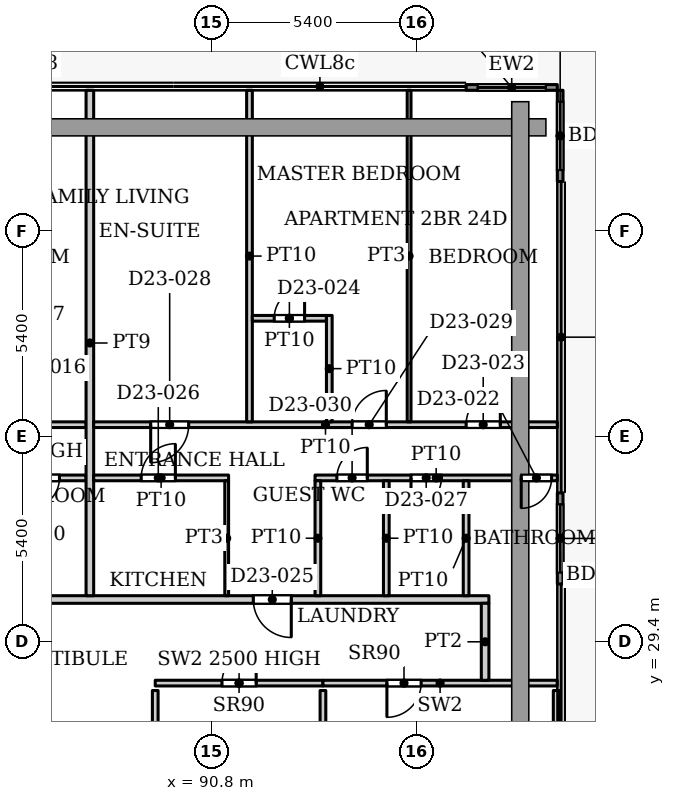
"""IFC4 building model, lengths in metres.
Left out: names, types, materials, properties, quantities, classifications, styles, units other than length and angle.
Written with IfcOpenShell. Run it as: python <this file> out.ifc"""

import sys

from ifc_helpers import new_model, si_unit, direction, frame, frame_2d, origin, place, context, subcontext, project, spatial, rectangle, extrude, source, transform, mapped, element, fill, save


model = new_model("IFC4")
c1 = context("Model", 3, precision=1e-05, world=origin(), true_north=direction((0.0, 1.0)))
c2 = subcontext(c1, "Body", "Model", "MODEL_VIEW")
j1 = project(units=[si_unit("LENGTHUNIT", "METRE"), si_unit("PLANEANGLEUNIT", "RADIAN")], contexts=[c1])
p1 = place(None, origin())
s1 = spatial("IfcSite", under=j1, at=p1, CompositionType="ELEMENT")
p2 = place(p1, origin())
s2 = spatial("IfcBuilding", under=s1, at=p2, CompositionType="ELEMENT")
p3 = place(p2, frame((0.0, 0.0, 105.8)))
s3 = spatial("IfcBuildingStorey", under=s2, at=p3, CompositionType="ELEMENT", Elevation=105.8)
p4 = place(p3, frame((97.5, 43.975, 0.0), z_axis=(0.0, 0.0, 1.0), x_axis=(1.0, 0.0, 0.0)))
e1 = element("IfcWall", 1, at=p4, inside=s3, PredefinedType="SOLIDWALL", context=c2, shape_type="SweptSolid", body=[
    extrude(rectangle(XDim=2.4, YDim=0.15, at=frame_2d((1.2, 0.0))), origin(), (0.0, 0.0, 1.0), 3.75),
])
p5 = place(p4, frame((0.3, 0.0, 0.0)))
e2 = element("IfcOpeningElement", 2, at=p5, cuts=e1, PredefinedType="OPENING", context=c2, shape_type="SweptSolid", body=[
    extrude(rectangle(XDim=1.8, YDim=2.4, at=frame_2d((0.9, 1.2))), frame((0.0, 0.085, 0.0), z_axis=(0.0, -1.0, 0.0), x_axis=(1.0, 0.0, 0.0)), (0.0, 0.0, 1.0), 0.17),
])
p6 = place(p3, frame((99.975, 43.9, 0.0), z_axis=(0.0, 0.0, 1.0), x_axis=(0.0, -1.0, 0.0)))
e3 = element("IfcWall", 3, at=p6, inside=s3, PredefinedType="SOLIDWALL", context=c2, shape_type="SweptSolid", body=[
    extrude(rectangle(XDim=2.4, YDim=0.15, at=frame_2d((1.2, 0.0))), origin(), (0.0, 0.0, 1.0), 3.75),
])
p7 = place(p6, frame((0.3, 0.0, 0.0)))
e4 = element("IfcOpeningElement", 4, at=p7, cuts=e3, PredefinedType="OPENING", context=c2, shape_type="SweptSolid", body=[
    extrude(rectangle(XDim=1.8, YDim=2.4, at=frame_2d((0.9, 1.2))), frame((0.0, 0.085, 0.0), z_axis=(0.0, -1.0, 0.0), x_axis=(1.0, 0.0, 0.0)), (0.0, 0.0, 1.0), 0.17),
])
p8 = place(p3, frame((99.975, 33.307, 0.0), z_axis=(0.0, 0.0, 1.0), x_axis=(0.0, -1.0, 0.0)))
e5 = element("IfcWall", 5, at=p8, inside=s3, PredefinedType="SOLIDWALL", context=c2, shape_type="SweptSolid", body=[
    extrude(rectangle(XDim=2.4, YDim=0.15, at=frame_2d((1.2, 0.0))), origin(), (0.0, 0.0, 1.0), 3.75),
])
p9 = place(p8, frame((0.3, 0.0, 0.0)))
e6 = element("IfcOpeningElement", 6, at=p9, cuts=e5, PredefinedType="OPENING", context=c2, shape_type="SweptSolid", body=[
    extrude(rectangle(XDim=1.8, YDim=2.4, at=frame_2d((0.9, 1.2))), frame((0.0, 0.085, 0.0), z_axis=(0.0, -1.0, 0.0), x_axis=(1.0, 0.0, 0.0)), (0.0, 0.0, 1.0), 0.17),
])
p10 = place(p3, frame((89.32, 28.3, 0.0), z_axis=(0.0, 0.0, 1.0), x_axis=(1.0, 0.0, 0.0)))
e7 = element("IfcWall", 7, at=p10, inside=s3, PredefinedType="PARTITIONING", context=c2, shape_type="SweptSolid", body=[
    extrude(rectangle(XDim=4.413, YDim=0.15, at=frame_2d((2.207, 0.0))), origin(), (0.0, 0.0, 1.0), 2.5),
])
p11 = place(p10, frame((1.756, 0.0, 0.0)))
e8 = element("IfcOpeningElement", 8, at=p11, cuts=e7, PredefinedType="OPENING", context=c2, shape_type="SweptSolid", body=[
    extrude(rectangle(XDim=0.9, YDim=2.2, at=frame_2d((0.45, 1.1))), frame((0.0, 0.085, 0.0), z_axis=(0.0, -1.0, 0.0), x_axis=(1.0, 0.0, 0.0)), (0.0, 0.0, 1.0), 0.17),
])
p12 = place(p3, frame((89.32, 25.62, 0.0), z_axis=(0.0, 0.0, 1.0), x_axis=(0.0, 1.0, 0.0)))
e9 = element("IfcWall", 9, at=p12, inside=s3, PredefinedType="PARTITIONING", context=c2, shape_type="SweptSolid", body=[
    extrude(rectangle(XDim=2.485, YDim=0.15, at=frame_2d((1.242, 0.0))), origin(), (0.0, 0.0, 1.0), 3.9),
])
p13 = place(p3, frame((93.733, 21.338, 0.0), z_axis=(0.0, 0.0, 1.0), x_axis=(0.0, 1.0, 0.0)))
e10 = element("IfcWall", 10, at=p13, inside=s3, PredefinedType="PARTITIONING", context=c2, shape_type="SweptSolid", body=[
    extrude(rectangle(XDim=6.767, YDim=0.15, at=frame_2d((3.384, 0.0))), origin(), (0.0, 0.0, 1.0), 3.9),
])
p14 = place(p3, frame((93.733, 28.3, 0.0), z_axis=(0.0, 0.0, 1.0), x_axis=(1.0, 0.0, 0.0)))
e11 = element("IfcWall", 11, at=p14, inside=s3, PredefinedType="PARTITIONING", context=c2, shape_type="SweptSolid", body=[
    extrude(rectangle(XDim=6.165, YDim=0.15, at=frame_2d((3.083, 0.0))), origin(), (0.0, 0.0, 1.0), 3.9),
])
p15 = place(p14, frame((1.683, 0.0, 0.0)))
e12 = element("IfcOpeningElement", 12, at=p15, cuts=e11, PredefinedType="OPENING", context=c2, shape_type="SweptSolid", body=[
    extrude(rectangle(XDim=0.9, YDim=2.2, at=frame_2d((0.45, 1.1))), frame((0.0, 0.085, 0.0), z_axis=(0.0, -1.0, 0.0), x_axis=(1.0, 0.0, 0.0)), (0.0, 0.0, 1.0), 0.17),
])
p16 = place(p3, frame((99.87, 21.015, 0.0), z_axis=(0.0, 0.0, 1.0), x_axis=(0.0, 1.0, 0.0)))
e13 = element("IfcWall", 13, at=p16, inside=s3, PredefinedType="PARTITIONING", context=c2, shape_type="SweptSolid", body=[
    extrude(rectangle(XDim=7.09, YDim=0.15, at=frame_2d((3.545, 0.0))), origin(), (0.0, 0.0, 1.0), 3.9),
])
p17 = place(p3, frame((55.9, 30.5, 0.0), z_axis=(0.0, 0.0, 1.0), x_axis=(1.0, 0.0, 0.0)))
e14 = element("IfcWall", 14, at=p17, inside=s3, PredefinedType="PARTITIONING", context=c2, shape_type="SweptSolid", body=[
    extrude(rectangle(XDim=42.2, YDim=0.2, at=frame_2d((21.1, 0.0))), origin(), (0.0, 0.0, 1.0), 3.6),
])
p18 = place(p17, frame((10.35, 0.0, 0.0)))
e15 = element("IfcOpeningElement", 15, at=p18, cuts=e14, PredefinedType="OPENING", context=c2, shape_type="SweptSolid", body=[
    extrude(rectangle(XDim=1.0, YDim=2.1, at=frame_2d((0.5, 1.05))), frame((0.0, 0.11, 0.0), z_axis=(0.0, -1.0, 0.0), x_axis=(1.0, 0.0, 0.0)), (0.0, 0.0, 1.0), 0.22),
])
p19 = place(p17, frame((16.65, 0.0, 0.0)))
e16 = element("IfcOpeningElement", 16, at=p19, cuts=e14, PredefinedType="OPENING", context=c2, shape_type="SweptSolid", body=[
    extrude(rectangle(XDim=1.0, YDim=2.1, at=frame_2d((0.5, 1.05))), frame((0.0, 0.11, 0.0), z_axis=(0.0, -1.0, 0.0), x_axis=(1.0, 0.0, 0.0)), (0.0, 0.0, 1.0), 0.22),
])
p20 = place(p17, frame((27.6, 0.0, 0.0)))
e17 = element("IfcOpeningElement", 17, at=p20, cuts=e14, PredefinedType="OPENING", context=c2, shape_type="SweptSolid", body=[
    extrude(rectangle(XDim=1.0, YDim=2.1, at=frame_2d((0.5, 1.05))), frame((0.0, 0.11, 0.0), z_axis=(0.0, -1.0, 0.0), x_axis=(1.0, 0.0, 0.0)), (0.0, 0.0, 1.0), 0.22),
])
p21 = place(p17, frame((36.0, 0.0, 0.0)))
e18 = element("IfcOpeningElement", 18, at=p21, cuts=e14, PredefinedType="OPENING", context=c2, shape_type="SweptSolid", body=[
    extrude(rectangle(XDim=1.0, YDim=2.1, at=frame_2d((0.5, 1.05))), frame((0.0, 0.11, 0.0), z_axis=(0.0, -1.0, 0.0), x_axis=(1.0, 0.0, 0.0)), (0.0, 0.0, 1.0), 0.22),
])
p22 = place(p3, frame((77.5, 35.1, 0.0), z_axis=(0.0, 0.0, 1.0), x_axis=(1.0, 0.0, 0.0)))
e19 = element("IfcWall", 19, at=p22, inside=s3, PredefinedType="PARTITIONING", context=c2, shape_type="SweptSolid", body=[
    extrude(rectangle(XDim=10.0, YDim=0.15, at=frame_2d((5.0, 0.0))), origin(), (0.0, 0.0, 1.0), 3.6),
])
p23 = place(p22, frame((7.9, 0.0, 0.0)))
e20 = element("IfcOpeningElement", 20, at=p23, cuts=e19, PredefinedType="OPENING", context=c2, shape_type="SweptSolid", body=[
    extrude(rectangle(XDim=0.9, YDim=2.1, at=frame_2d((0.45, 1.05))), frame((0.0, 0.085, 0.0), z_axis=(0.0, -1.0, 0.0), x_axis=(1.0, 0.0, 0.0)), (0.0, 0.0, 1.0), 0.17),
])
p24 = place(p22, frame((2.55, 0.0, 0.0)))
e21 = element("IfcOpeningElement", 21, at=p24, cuts=e19, PredefinedType="OPENING", context=c2, shape_type="SweptSolid", body=[
    extrude(rectangle(XDim=1.0, YDim=2.1, at=frame_2d((0.5, 1.05))), frame((0.0, 0.085, 0.0), z_axis=(0.0, -1.0, 0.0), x_axis=(1.0, 0.0, 0.0)), (0.0, 0.0, 1.0), 0.17),
])
p25 = place(p3, frame((85.275, 33.7, 0.0), z_axis=(0.0, 0.0, 1.0), x_axis=(1.0, 0.0, 0.0)))
e22 = element("IfcWall", 22, at=p25, inside=s3, PredefinedType="PARTITIONING", context=c2, shape_type="SweptSolid", body=[
    extrude(rectangle(XDim=2.225, YDim=0.15, at=frame_2d((1.113, 0.0))), origin(), (0.0, 0.0, 1.0), 3.6),
])
p26 = place(p25, frame((0.725, 0.0, 0.0)))
e23 = element("IfcOpeningElement", 23, at=p26, cuts=e22, PredefinedType="OPENING", context=c2, shape_type="SweptSolid", body=[
    extrude(rectangle(XDim=0.8, YDim=2.1, at=frame_2d((0.4, 1.05))), frame((0.0, 0.085, 0.0), z_axis=(0.0, -1.0, 0.0), x_axis=(1.0, 0.0, 0.0)), (0.0, 0.0, 1.0), 0.17),
])
p27 = place(p3, frame((87.6, 30.6, 0.0), z_axis=(0.0, 0.0, 1.0), x_axis=(0.0, 1.0, 0.0)))
e24 = element("IfcWall", 24, at=p27, inside=s3, PredefinedType="PARTITIONING", context=c2, shape_type="SweptSolid", body=[
    extrude(rectangle(XDim=13.3, YDim=0.2, at=frame_2d((6.65, 0.0))), origin(), (0.0, 0.0, 1.0), 3.6),
])
p28 = place(p3, frame((87.7, 33.7, 0.0), z_axis=(0.0, 0.0, 1.0), x_axis=(1.0, 0.0, 0.0)))
e25 = element("IfcWall", 25, at=p28, inside=s3, PredefinedType="PARTITIONING", context=c2, shape_type="SweptSolid", body=[
    extrude(rectangle(XDim=3.55, YDim=0.15, at=frame_2d((1.775, 0.0))), origin(), (0.0, 0.0, 1.0), 3.6),
])
p29 = place(p28, frame((1.25, 0.0, 0.0)))
e26 = element("IfcOpeningElement", 26, at=p29, cuts=e25, PredefinedType="OPENING", context=c2, shape_type="SweptSolid", body=[
    extrude(rectangle(XDim=0.9, YDim=2.1, at=frame_2d((0.45, 1.05))), frame((0.0, 0.085, 0.0), z_axis=(0.0, -1.0, 0.0), x_axis=(1.0, 0.0, 0.0)), (0.0, 0.0, 1.0), 0.17),
])
p30 = place(p3, frame((87.7, 35.1, 0.0), z_axis=(0.0, 0.0, 1.0), x_axis=(1.0, 0.0, 0.0)))
e27 = element("IfcWall", 27, at=p30, inside=s3, PredefinedType="PARTITIONING", context=c2, shape_type="SweptSolid", body=[
    extrude(rectangle(XDim=12.2, YDim=0.15, at=frame_2d((6.1, 0.0))), origin(), (0.0, 0.0, 1.0), 3.6),
])
p31 = place(p30, frame((9.8, 0.0, 0.0)))
e28 = element("IfcOpeningElement", 28, at=p31, cuts=e27, PredefinedType="OPENING", context=c2, shape_type="SweptSolid", body=[
    extrude(rectangle(XDim=0.9, YDim=2.1, at=frame_2d((0.45, 1.05))), frame((0.0, 0.085, 0.0), z_axis=(0.0, -1.0, 0.0), x_axis=(1.0, 0.0, 0.0)), (0.0, 0.0, 1.0), 0.17),
])
p32 = place(p30, frame((1.5, 0.0, 0.0)))
e29 = element("IfcOpeningElement", 29, at=p32, cuts=e27, PredefinedType="OPENING", context=c2, shape_type="SweptSolid", body=[
    extrude(rectangle(XDim=1.0, YDim=2.1, at=frame_2d((0.5, 1.05))), frame((0.0, 0.085, 0.0), z_axis=(0.0, -1.0, 0.0), x_axis=(1.0, 0.0, 0.0)), (0.0, 0.0, 1.0), 0.17),
])
p33 = place(p30, frame((6.8, 0.0, 0.0)))
e30 = element("IfcOpeningElement", 30, at=p33, cuts=e27, PredefinedType="OPENING", context=c2, shape_type="SweptSolid", body=[
    extrude(rectangle(XDim=0.9, YDim=2.1, at=frame_2d((0.45, 1.05))), frame((0.0, 0.085, 0.0), z_axis=(0.0, -1.0, 0.0), x_axis=(1.0, 0.0, 0.0)), (0.0, 0.0, 1.0), 0.17),
])
p34 = place(p3, frame((91.2, 30.6, 0.0), z_axis=(0.0, 0.0, 1.0), x_axis=(0.0, 1.0, 0.0)))
e31 = element("IfcWall", 31, at=p34, inside=s3, PredefinedType="PARTITIONING", context=c2, shape_type="SweptSolid", body=[
    extrude(rectangle(XDim=3.025, YDim=0.1, at=frame_2d((1.512, 0.0))), origin(), (0.0, 0.0, 1.0), 3.6),
])
p35 = place(p3, frame((91.8, 35.175, 0.0), z_axis=(0.0, 0.0, 1.0), x_axis=(0.0, 1.0, 0.0)))
e32 = element("IfcWall", 32, at=p35, inside=s3, PredefinedType="PARTITIONING", context=c2, shape_type="SweptSolid", body=[
    extrude(rectangle(XDim=8.725, YDim=0.15, at=frame_2d((4.362, 0.0))), origin(), (0.0, 0.0, 1.0), 3.6),
])
p36 = place(p3, frame((91.875, 37.9, 0.0), z_axis=(0.0, 0.0, 1.0), x_axis=(1.0, 0.0, 0.0)))
e33 = element("IfcWall", 33, at=p36, inside=s3, PredefinedType="PARTITIONING", context=c2, shape_type="SweptSolid", body=[
    extrude(rectangle(XDim=1.95, YDim=0.15, at=frame_2d((0.975, 0.0))), origin(), (0.0, 0.0, 1.0), 3.6),
])
p37 = place(p36, frame((0.575, 0.0, 0.0)))
e34 = element("IfcOpeningElement", 34, at=p37, cuts=e33, PredefinedType="OPENING", context=c2, shape_type="SweptSolid", body=[
    extrude(rectangle(XDim=0.8, YDim=2.1, at=frame_2d((0.4, 1.05))), frame((0.0, 0.085, 0.0), z_axis=(0.0, -1.0, 0.0), x_axis=(1.0, 0.0, 0.0)), (0.0, 0.0, 1.0), 0.17),
])
p38 = place(p3, frame((93.525, 33.7, 0.0), z_axis=(0.0, 0.0, 1.0), x_axis=(1.0, 0.0, 0.0)))
e35 = element("IfcWall", 35, at=p38, inside=s3, PredefinedType="PARTITIONING", context=c2, shape_type="SweptSolid", body=[
    extrude(rectangle(XDim=6.375, YDim=0.15, at=frame_2d((3.188, 0.0))), origin(), (0.0, 0.0, 1.0), 3.6),
])
p39 = place(p38, frame((5.425, 0.0, 0.0)))
e36 = element("IfcOpeningElement", 36, at=p39, cuts=e35, PredefinedType="OPENING", context=c2, shape_type="SweptSolid", body=[
    extrude(rectangle(XDim=0.8, YDim=2.1, at=frame_2d((0.4, 1.05))), frame((0.0, 0.085, 0.0), z_axis=(0.0, -1.0, 0.0), x_axis=(1.0, 0.0, 0.0)), (0.0, 0.0, 1.0), 0.17),
])
p40 = place(p38, frame((2.525, 0.0, 0.0)))
e37 = element("IfcOpeningElement", 37, at=p40, cuts=e35, PredefinedType="OPENING", context=c2, shape_type="SweptSolid", body=[
    extrude(rectangle(XDim=0.8, YDim=2.1, at=frame_2d((0.4, 1.05))), frame((0.0, 0.085, 0.0), z_axis=(0.0, -1.0, 0.0), x_axis=(1.0, 0.0, 0.0)), (0.0, 0.0, 1.0), 0.17),
])
p41 = place(p38, frame((0.575, 0.0, 0.0)))
e38 = element("IfcOpeningElement", 38, at=p41, cuts=e35, PredefinedType="OPENING", context=c2, shape_type="SweptSolid", body=[
    extrude(rectangle(XDim=0.8, YDim=2.1, at=frame_2d((0.4, 1.05))), frame((0.0, 0.085, 0.0), z_axis=(0.0, -1.0, 0.0), x_axis=(1.0, 0.0, 0.0)), (0.0, 0.0, 1.0), 0.17),
])
p42 = place(p3, frame((93.6, 30.6, 0.0), z_axis=(0.0, 0.0, 1.0), x_axis=(0.0, 1.0, 0.0)))
e39 = element("IfcWall", 39, at=p42, inside=s3, PredefinedType="PARTITIONING", context=c2, shape_type="SweptSolid", body=[
    extrude(rectangle(XDim=3.025, YDim=0.15, at=frame_2d((1.512, 0.0))), origin(), (0.0, 0.0, 1.0), 3.6),
])
p43 = place(p3, frame((93.9, 35.175, 0.0), z_axis=(0.0, 0.0, 1.0), x_axis=(0.0, 1.0, 0.0)))
e40 = element("IfcWall", 40, at=p43, inside=s3, PredefinedType="PARTITIONING", context=c2, shape_type="SweptSolid", body=[
    extrude(rectangle(XDim=2.8, YDim=0.15, at=frame_2d((1.4, 0.0))), origin(), (0.0, 0.0, 1.0), 3.6),
])
p44 = place(p3, frame((95.4, 30.6, 0.0), z_axis=(0.0, 0.0, 1.0), x_axis=(0.0, 1.0, 0.0)))
e41 = element("IfcWall", 41, at=p44, inside=s3, PredefinedType="PARTITIONING", context=c2, shape_type="SweptSolid", body=[
    extrude(rectangle(XDim=3.025, YDim=0.15, at=frame_2d((1.512, 0.0))), origin(), (0.0, 0.0, 1.0), 3.6),
])
p45 = place(p3, frame((96.0, 35.175, 0.0), z_axis=(0.0, 0.0, 1.0), x_axis=(0.0, 1.0, 0.0)))
e42 = element("IfcWall", 42, at=p45, inside=s3, PredefinedType="PARTITIONING", context=c2, shape_type="SweptSolid", body=[
    extrude(rectangle(XDim=8.725, YDim=0.1, at=frame_2d((4.362, 0.0))), origin(), (0.0, 0.0, 1.0), 3.6),
])
p46 = place(p3, frame((97.5, 30.6, 0.0), z_axis=(0.0, 0.0, 1.0), x_axis=(0.0, 1.0, 0.0)))
e43 = element("IfcWall", 43, at=p46, inside=s3, PredefinedType="PARTITIONING", context=c2, shape_type="SweptSolid", body=[
    extrude(rectangle(XDim=3.025, YDim=0.15, at=frame_2d((1.512, 0.0))), origin(), (0.0, 0.0, 1.0), 3.6),
])
p47 = place(p3, frame((98.0, 28.374, 0.0), z_axis=(0.0, 0.0, 1.0), x_axis=(0.0, 1.0, 0.0)))
e44 = element("IfcWall", 44, at=p47, inside=s3, PredefinedType="PARTITIONING", context=c2, shape_type="SweptSolid", body=[
    extrude(rectangle(XDim=2.026, YDim=0.2, at=frame_2d((1.013, 0.0))), origin(), (0.0, 0.0, 1.0), 3.6),
])
m1 = source(origin(), c2, "Body", "SweptSolid", [
    extrude(rectangle(XDim=1.8, YDim=2.4, at=frame_2d((0.9, 1.2))), frame((0.0, 0.025, 0.0), z_axis=(0.0, -1.0, 0.0), x_axis=(1.0, 0.0, 0.0)), (0.0, 0.0, 1.0), 0.05),
])
p48 = place(p5, origin())
e45 = element("IfcDoor", 45, at=p48, inside=s3, OperationType="SLIDING_TO_LEFT", PredefinedType="DOOR", context=c2, shape_type="MappedRepresentation", body=[
    mapped(m1, transform((0.0, 0.0, 0.0), x_axis=(1.0, 0.0, 0.0), y_axis=(0.0, 1.0, 0.0), z_axis=(0.0, 0.0, 1.0), scale=1.0)),
])
fill(e2, e45)
p49 = place(p7, origin())
e46 = element("IfcDoor", 46, at=p49, inside=s3, OperationType="SLIDING_TO_LEFT", PredefinedType="DOOR", context=c2, shape_type="MappedRepresentation", body=[
    mapped(m1, transform((0.0, 0.0, 0.0), x_axis=(1.0, 0.0, 0.0), y_axis=(0.0, 1.0, 0.0), z_axis=(0.0, 0.0, 1.0), scale=1.0)),
])
fill(e4, e46)
p50 = place(p9, origin())
e47 = element("IfcDoor", 47, at=p50, inside=s3, OperationType="SLIDING_TO_LEFT", PredefinedType="DOOR", context=c2, shape_type="MappedRepresentation", body=[
    mapped(m1, transform((0.0, 0.0, 0.0), x_axis=(1.0, 0.0, 0.0), y_axis=(0.0, 1.0, 0.0), z_axis=(0.0, 0.0, 1.0), scale=1.0)),
])
fill(e6, e47)
m2 = source(origin(), c2, "Body", "SweptSolid", [
    extrude(rectangle(XDim=0.9, YDim=2.2, at=frame_2d((0.45, 1.1))), frame((0.0, 0.025, 0.0), z_axis=(0.0, -1.0, 0.0), x_axis=(1.0, 0.0, 0.0)), (0.0, 0.0, 1.0), 0.05),
])
p51 = place(p11, origin())
e48 = element("IfcDoor", 48, at=p51, inside=s3, OperationType="SINGLE_SWING_LEFT", PredefinedType="DOOR", context=c2, shape_type="MappedRepresentation", body=[
    mapped(m2, transform((0.0, 0.0, 0.0), x_axis=(1.0, 0.0, 0.0), y_axis=(0.0, 1.0, 0.0), z_axis=(0.0, 0.0, 1.0), scale=1.0)),
])
fill(e8, e48)
p52 = place(p15, origin())
e49 = element("IfcDoor", 49, at=p52, inside=s3, OperationType="SINGLE_SWING_RIGHT", PredefinedType="DOOR", context=c2, shape_type="MappedRepresentation", body=[
    mapped(m2, transform((0.0, 0.0, 0.0), x_axis=(1.0, 0.0, 0.0), y_axis=(0.0, 1.0, 0.0), z_axis=(0.0, 0.0, 1.0), scale=1.0)),
])
fill(e12, e49)
m3 = source(origin(), c2, "Body", "SweptSolid", [
    extrude(rectangle(XDim=0.8, YDim=2.1, at=frame_2d((0.4, 1.05))), frame((0.0, 0.025, 0.0), z_axis=(0.0, -1.0, 0.0), x_axis=(1.0, 0.0, 0.0)), (0.0, 0.0, 1.0), 0.05),
])
p53 = place(p26, origin())
e50 = element("IfcDoor", 50, at=p53, inside=s3, OperationType="SINGLE_SWING_RIGHT", PredefinedType="DOOR", context=c2, shape_type="MappedRepresentation", body=[
    mapped(m3, transform((0.0, 0.0, 0.0), x_axis=(1.0, 0.0, 0.0), y_axis=(0.0, 1.0, 0.0), z_axis=(0.0, 0.0, 1.0), scale=1.0)),
])
fill(e23, e50)
p54 = place(p39, origin())
e51 = element("IfcDoor", 51, at=p54, inside=s3, OperationType="SINGLE_SWING_RIGHT", PredefinedType="DOOR", context=c2, shape_type="MappedRepresentation", body=[
    mapped(m3, transform((0.0, 0.0, 0.0), x_axis=(1.0, 0.0, 0.0), y_axis=(0.0, 1.0, 0.0), z_axis=(0.0, 0.0, 1.0), scale=1.0)),
])
fill(e36, e51)
m4 = source(origin(), c2, "Body", "SweptSolid", [
    extrude(rectangle(XDim=0.9, YDim=2.1, at=frame_2d((0.45, 1.05))), frame((0.0, 0.025, 0.0), z_axis=(0.0, -1.0, 0.0), x_axis=(1.0, 0.0, 0.0)), (0.0, 0.0, 1.0), 0.05),
])
p55 = place(p31, origin())
e52 = element("IfcDoor", 52, at=p55, inside=s3, OperationType="SINGLE_SWING_LEFT", PredefinedType="DOOR", context=c2, shape_type="MappedRepresentation", body=[
    mapped(m4, transform((0.0, 0.0, 0.0), x_axis=(1.0, 0.0, 0.0), y_axis=(0.0, 1.0, 0.0), z_axis=(0.0, 0.0, 1.0), scale=1.0)),
])
fill(e28, e52)
p56 = place(p37, origin())
e53 = element("IfcDoor", 53, at=p56, inside=s3, OperationType="SINGLE_SWING_LEFT", PredefinedType="DOOR", context=c2, shape_type="MappedRepresentation", body=[
    mapped(m3, transform((0.0, 0.0, 0.0), x_axis=(1.0, 0.0, 0.0), y_axis=(0.0, 1.0, 0.0), z_axis=(0.0, 0.0, 1.0), scale=1.0)),
])
fill(e34, e53)
m5 = source(origin(), c2, "Body", "SweptSolid", [
    extrude(rectangle(XDim=1.0, YDim=2.1, at=frame_2d((0.5, 1.05))), frame((0.0, 0.025, 0.0), z_axis=(0.0, -1.0, 0.0), x_axis=(1.0, 0.0, 0.0)), (0.0, 0.0, 1.0), 0.05),
])
p57 = place(p21, origin())
e54 = element("IfcDoor", 54, at=p57, inside=s3, OperationType="SINGLE_SWING_RIGHT", PredefinedType="DOOR", context=c2, shape_type="MappedRepresentation", body=[
    mapped(m5, transform((0.0, 0.0, 0.0), x_axis=(1.0, 0.0, 0.0), y_axis=(0.0, 1.0, 0.0), z_axis=(0.0, 0.0, 1.0), scale=1.0)),
])
fill(e18, e54)
p58 = place(p29, origin())
e55 = element("IfcDoor", 55, at=p58, inside=s3, OperationType="SINGLE_SWING_LEFT", PredefinedType="DOOR", context=c2, shape_type="MappedRepresentation", body=[
    mapped(m4, transform((0.0, 0.0, 0.0), x_axis=(1.0, 0.0, 0.0), y_axis=(0.0, 1.0, 0.0), z_axis=(0.0, 0.0, 1.0), scale=1.0)),
])
fill(e26, e55)
p59 = place(p40, origin())
e56 = element("IfcDoor", 56, at=p59, inside=s3, OperationType="SINGLE_SWING_RIGHT", PredefinedType="DOOR", context=c2, shape_type="MappedRepresentation", body=[
    mapped(m3, transform((0.0, 0.0, 0.0), x_axis=(1.0, 0.0, 0.0), y_axis=(0.0, 1.0, 0.0), z_axis=(0.0, 0.0, 1.0), scale=1.0)),
])
fill(e37, e56)
m6 = source(origin(), c2, "Body", "SweptSolid", [
    extrude(rectangle(XDim=1.0, YDim=2.1, at=frame_2d((0.5, 1.05))), frame((0.0, 0.025, 0.0), z_axis=(0.0, -1.0, 0.0), x_axis=(1.0, 0.0, 0.0)), (0.0, 0.0, 1.0), 0.05),
])
p60 = place(p32, origin())
e57 = element("IfcDoor", 57, at=p60, inside=s3, OperationType="SINGLE_SWING_RIGHT", PredefinedType="DOOR", context=c2, shape_type="MappedRepresentation", body=[
    mapped(m6, transform((0.0, 0.0, 0.0), x_axis=(1.0, 0.0, 0.0), y_axis=(0.0, 1.0, 0.0), z_axis=(0.0, 0.0, 1.0), scale=1.0)),
])
fill(e29, e57)
p61 = place(p33, origin())
e58 = element("IfcDoor", 58, at=p61, inside=s3, OperationType="SINGLE_SWING_LEFT", PredefinedType="DOOR", context=c2, shape_type="MappedRepresentation", body=[
    mapped(m4, transform((0.0, 0.0, 0.0), x_axis=(1.0, 0.0, 0.0), y_axis=(0.0, 1.0, 0.0), z_axis=(0.0, 0.0, 1.0), scale=1.0)),
])
fill(e30, e58)
p62 = place(p41, origin())
e59 = element("IfcDoor", 59, at=p62, inside=s3, OperationType="SINGLE_SWING_LEFT", PredefinedType="DOOR", context=c2, shape_type="MappedRepresentation", body=[
    mapped(m3, transform((0.0, 0.0, 0.0), x_axis=(1.0, 0.0, 0.0), y_axis=(0.0, 1.0, 0.0), z_axis=(0.0, 0.0, 1.0), scale=1.0)),
])
fill(e38, e59)
save(model, sys.argv[1])
